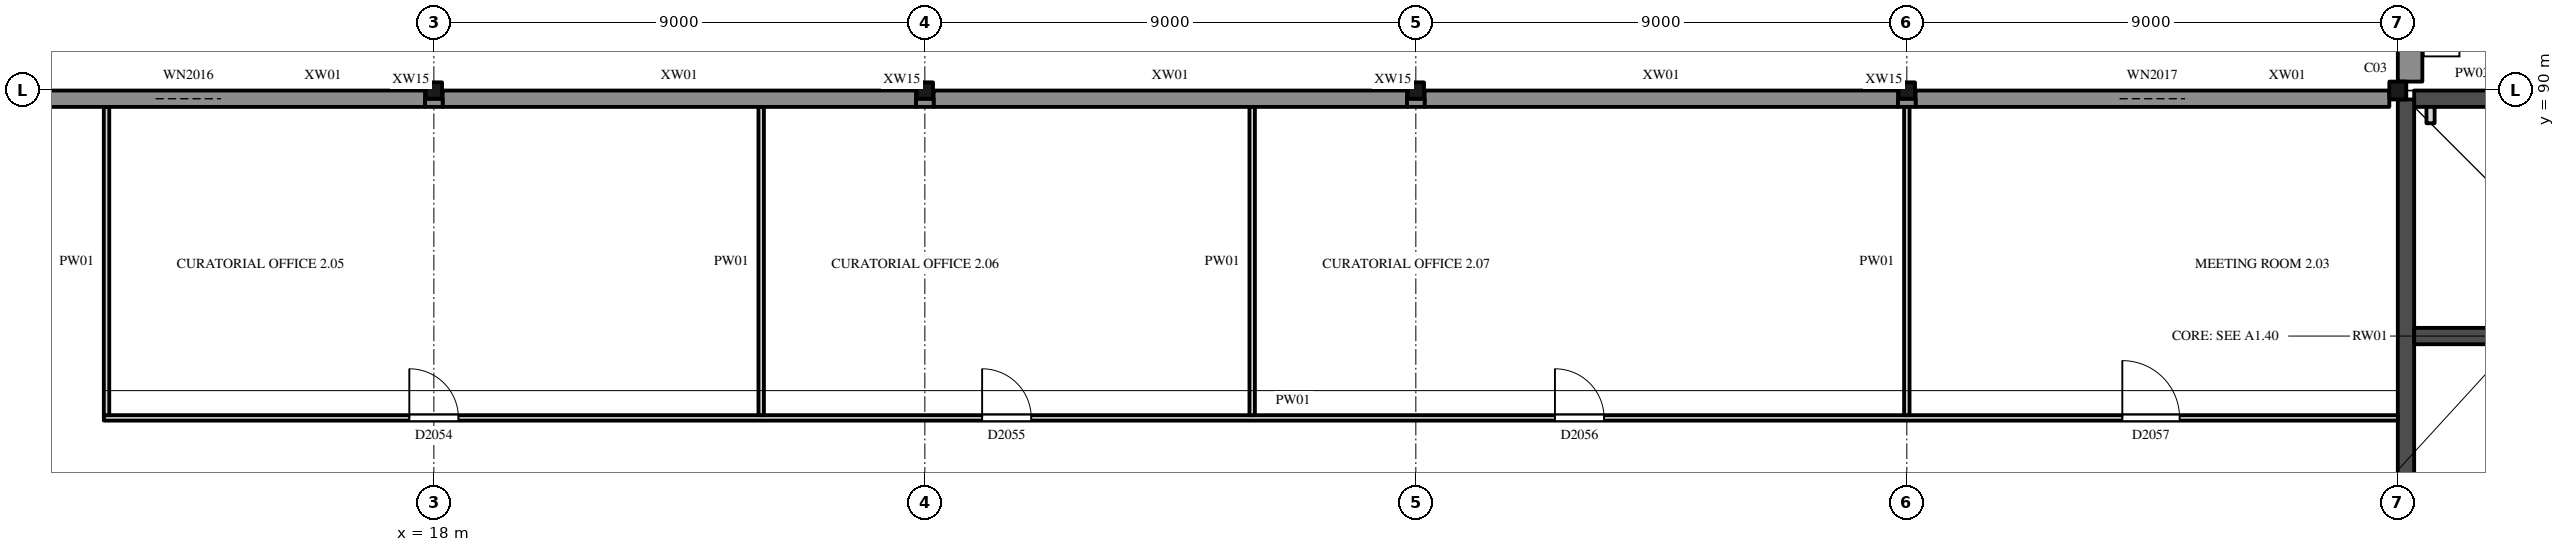
"""IFC4 building model, lengths in metres.
Left out: names, types, materials, properties, quantities, classifications, styles, units other than length and angle.
Written with IfcOpenShell. Run it as: python <this file> out.ifc"""

import sys

from ifc_helpers import new_model, si_unit, direction, frame, frame_2d, origin, origin_2d, place, context, subcontext, project, spatial, rectangle, hollow_rectangle, i_section, extrude, element, fill, save


model = new_model("IFC4")
c1 = context("Model", 3, precision=1e-05, world=origin(), true_north=direction((0.0, 1.0)))
c2 = subcontext(c1, "Body", "Model", "MODEL_VIEW")
j1 = project(units=[si_unit("LENGTHUNIT", "METRE"), si_unit("PLANEANGLEUNIT", "RADIAN")], contexts=[c1])
p1 = place(None, origin())
s1 = spatial("IfcSite", under=j1, at=p1, CompositionType="ELEMENT")
p2 = place(p1, origin())
s2 = spatial("IfcBuilding", under=s1, at=p2, CompositionType="ELEMENT")
p3 = place(p2, frame((0.0, 0.0, 11.0)))
s3 = spatial("IfcBuildingStorey", under=s2, at=p3, CompositionType="ELEMENT", Elevation=11.0)
for number, where, z_axis, x_axis in (
    (1, (18.0, 90.0, 0.0), (0.0, 0.0, 1.0), (1.0, 0.0, 0.0)),
    (2, (27.0, 90.0, 0.0), (0.0, 0.0, 1.0), (1.0, 0.0, 0.0)),
    (3, (36.0, 90.0, 0.0), (0.0, 0.0, 1.0), (1.0, 0.0, 0.0)),
    (4, (45.0, 90.0, 0.0), (0.0, 0.0, 1.0), (1.0, 0.0, 0.0)),
):
    element("IfcColumn", number, at=place(p3, frame(where, z_axis=z_axis, x_axis=x_axis)), inside=s3, PredefinedType="COLUMN", context=c2, shape_type="SweptSolid", body=[
        extrude(hollow_rectangle(XDim=0.3, YDim=0.3, WallThickness=0.012, InnerFilletRadius=0.019, OuterFilletRadius=0.031, at=origin_2d()), origin(), (0.0, 0.0, 1.0), 4.825),
    ])
p4 = place(p3, frame((54.0, 90.0, 0.0), z_axis=(0.0, 0.0, 1.0), x_axis=(1.0, 0.0, 0.0)))
e5 = element("IfcColumn", 5, at=p4, inside=s3, PredefinedType="COLUMN", context=c2, shape_type="SweptSolid", body=[
    extrude(i_section(OverallWidth=0.311, OverallDepth=0.327, WebThickness=0.016, FlangeThickness=0.025, FilletRadius=0.017, at=origin_2d()), origin(), (0.0, 0.0, 1.0), 5.0),
])
p5 = place(p3, frame((54.3, 89.85, 0.0), z_axis=(0.0, 0.0, 1.0), x_axis=(1.0, 0.0, 0.0)))
e6 = element("IfcWall", 6, at=p5, inside=s3, PredefinedType="SHEAR", context=c2, shape_type="SweptSolid", body=[
    extrude(rectangle(XDim=8.544, YDim=0.3, at=frame_2d((4.272, 0.0))), origin(), (0.0, 0.0, 1.0), 5.0),
])
p6 = place(p3, frame((54.15, 81.157, 0.0), z_axis=(0.0, 0.0, 1.0), x_axis=(0.0, 1.0, 0.0)))
e7 = element("IfcWall", 7, at=p6, inside=s3, PredefinedType="SHEAR", context=c2, shape_type="SweptSolid", body=[
    extrude(rectangle(XDim=8.679, YDim=0.3, at=frame_2d((4.34, 0.0))), origin(), (0.0, 0.0, 1.0), 5.0),
])
p7 = place(p3, frame((58.2, 85.5, 0.0), z_axis=(0.0, 0.0, 1.0), x_axis=(-1.0, 0.0, 0.0)))
e8 = element("IfcWall", 8, at=p7, inside=s3, PredefinedType="SHEAR", context=c2, shape_type="SweptSolid", body=[
    extrude(rectangle(XDim=3.9, YDim=0.3, at=frame_2d((1.95, 0.0))), origin(), (0.0, 0.0, 1.0), 5.0),
])
p8 = place(p3, frame((9.172, 89.85, 0.0), z_axis=(0.0, 0.0, 1.0), x_axis=(1.0, 0.0, 0.0)))
e9 = element("IfcWall", 9, at=p8, inside=s3, PredefinedType="SOLIDWALL", context=c2, shape_type="SweptSolid", body=[
    extrude(rectangle(XDim=8.667, YDim=0.3, at=frame_2d((4.333, 0.0))), origin(), (0.0, 0.0, 1.0), 4.825),
])
p9 = place(p8, frame((3.728, 0.0, 1.0)))
e10 = element("IfcOpeningElement", 10, at=p9, cuts=e9, PredefinedType="OPENING", context=c2, shape_type="SweptSolid", body=[
    extrude(rectangle(XDim=1.2, YDim=3.0, at=frame_2d((0.6, 1.5))), frame((0.0, 0.16, 0.0), z_axis=(0.0, -1.0, 0.0), x_axis=(1.0, 0.0, 0.0)), (0.0, 0.0, 1.0), 0.32),
])
for number, where, z_axis, x_axis in (
    (11, (18.161, 89.85, 0.0), (0.0, 0.0, 1.0), (1.0, 0.0, 0.0)),
    (12, (27.161, 89.85, 0.0), (0.0, 0.0, 1.0), (1.0, 0.0, 0.0)),
    (13, (36.161, 89.85, 0.0), (0.0, 0.0, 1.0), (1.0, 0.0, 0.0)),
):
    element("IfcWall", number, at=place(p3, frame(where, z_axis=z_axis, x_axis=x_axis)), inside=s3, PredefinedType="SOLIDWALL", context=c2, shape_type="SweptSolid", body=[
        extrude(rectangle(XDim=8.678, YDim=0.3, at=frame_2d((4.339, 0.0))), origin(), (0.0, 0.0, 1.0), 4.825),
    ])
p10 = place(p3, frame((45.161, 89.85, 0.0), z_axis=(0.0, 0.0, 1.0), x_axis=(1.0, 0.0, 0.0)))
e14 = element("IfcWall", 14, at=p10, inside=s3, PredefinedType="SOLIDWALL", context=c2, shape_type="SweptSolid", body=[
    extrude(rectangle(XDim=8.684, YDim=0.3, at=frame_2d((4.342, 0.0))), origin(), (0.0, 0.0, 1.0), 4.825),
])
p11 = place(p10, frame((3.739, 0.0, 1.0)))
e15 = element("IfcOpeningElement", 15, at=p11, cuts=e14, PredefinedType="OPENING", context=c2, shape_type="SweptSolid", body=[
    extrude(rectangle(XDim=1.2, YDim=3.0, at=frame_2d((0.6, 1.5))), frame((0.0, 0.16, 0.0), z_axis=(0.0, -1.0, 0.0), x_axis=(1.0, 0.0, 0.0)), (0.0, 0.0, 1.0), 0.32),
])
p12 = place(p3, frame((54.225, 90.164, 0.0), z_axis=(0.0, 0.0, 1.0), x_axis=(0.0, 1.0, 0.0)))
e16 = element("IfcWall", 16, at=p12, inside=s3, PredefinedType="SOLIDWALL", context=c2, shape_type="SweptSolid", body=[
    extrude(rectangle(XDim=8.676, YDim=0.45, at=frame_2d((4.338, 0.0))), origin(), (0.0, 0.0, 1.0), 4.371),
])
p13 = place(p12, frame((0.586, 0.0, 1.6)))
e17 = element("IfcOpeningElement", 17, at=p13, cuts=e16, PredefinedType="OPENING", context=c2, shape_type="SweptSolid", body=[
    extrude(rectangle(XDim=7.5, YDim=1.2, at=frame_2d((3.75, 0.6))), frame((0.0, 0.235, 0.0), z_axis=(0.0, -1.0, 0.0), x_axis=(1.0, 0.0, 0.0)), (0.0, 0.0, 1.0), 0.47),
])
for number, where, z_axis, x_axis in (
    (18, (17.839, 89.775, 0.0), (0.0, 0.0, 1.0), (1.0, 0.0, 0.0)),
    (19, (26.839, 89.775, 0.0), (0.0, 0.0, 1.0), (1.0, 0.0, 0.0)),
    (20, (35.839, 89.775, 0.0), (0.0, 0.0, 1.0), (1.0, 0.0, 0.0)),
    (21, (44.839, 89.775, 0.0), (0.0, 0.0, 1.0), (1.0, 0.0, 0.0)),
):
    element("IfcWall", number, at=place(p3, frame(where, z_axis=z_axis, x_axis=x_axis)), inside=s3, PredefinedType="SOLIDWALL", context=c2, shape_type="SweptSolid", body=[
        extrude(rectangle(XDim=0.322, YDim=0.15, at=frame_2d((0.161, 0.0))), origin(), (0.0, 0.0, 1.0), 4.825),
    ])
for number, where, z_axis, x_axis in (
    (22, (10.5, 83.325, 5.0), (0.0, 0.0, 1.0), (1.0, 0.0, 0.0)),
    (23, (10.5, 87.675, 5.0), (0.0, 0.0, 1.0), (1.0, 0.0, 0.0)),
):
    element("IfcWall", number, at=place(p3, frame(where, z_axis=z_axis, x_axis=x_axis)), inside=s3, PredefinedType="PARAPET", context=c2, shape_type="SweptSolid", body=[
        extrude(rectangle(XDim=6.0, YDim=0.15, at=frame_2d((3.0, 0.0))), origin(), (0.0, 0.0, 1.0), 0.5),
    ])
p14 = place(p3, frame((16.425, 83.4, 5.0), z_axis=(0.0, 0.0, 1.0), x_axis=(0.0, 1.0, 0.0)))
e24 = element("IfcWall", 24, at=p14, inside=s3, PredefinedType="PARAPET", context=c2, shape_type="SweptSolid", body=[
    extrude(rectangle(XDim=4.2, YDim=0.15, at=frame_2d((2.1, 0.0))), origin(), (0.0, 0.0, 1.0), 0.5),
])
for number, where, z_axis, x_axis in (
    (25, (19.5, 83.325, 5.0), (0.0, 0.0, 1.0), (1.0, 0.0, 0.0)),
    (26, (19.5, 87.675, 5.0), (0.0, 0.0, 1.0), (1.0, 0.0, 0.0)),
):
    element("IfcWall", number, at=place(p3, frame(where, z_axis=z_axis, x_axis=x_axis)), inside=s3, PredefinedType="PARAPET", context=c2, shape_type="SweptSolid", body=[
        extrude(rectangle(XDim=6.0, YDim=0.15, at=frame_2d((3.0, 0.0))), origin(), (0.0, 0.0, 1.0), 0.5),
    ])
for number, where, z_axis, x_axis in (
    (27, (19.575, 83.4, 5.0), (0.0, 0.0, 1.0), (0.0, 1.0, 0.0)),
    (28, (25.425, 83.4, 5.0), (0.0, 0.0, 1.0), (0.0, 1.0, 0.0)),
):
    element("IfcWall", number, at=place(p3, frame(where, z_axis=z_axis, x_axis=x_axis)), inside=s3, PredefinedType="PARAPET", context=c2, shape_type="SweptSolid", body=[
        extrude(rectangle(XDim=4.2, YDim=0.15, at=frame_2d((2.1, 0.0))), origin(), (0.0, 0.0, 1.0), 0.5),
    ])
for number, where, z_axis, x_axis in (
    (29, (28.5, 83.325, 5.0), (0.0, 0.0, 1.0), (1.0, 0.0, 0.0)),
    (30, (28.5, 87.675, 5.0), (0.0, 0.0, 1.0), (1.0, 0.0, 0.0)),
):
    element("IfcWall", number, at=place(p3, frame(where, z_axis=z_axis, x_axis=x_axis)), inside=s3, PredefinedType="PARAPET", context=c2, shape_type="SweptSolid", body=[
        extrude(rectangle(XDim=6.0, YDim=0.15, at=frame_2d((3.0, 0.0))), origin(), (0.0, 0.0, 1.0), 0.5),
    ])
for number, where, z_axis, x_axis in (
    (31, (28.575, 83.4, 5.0), (0.0, 0.0, 1.0), (0.0, 1.0, 0.0)),
    (32, (34.425, 83.4, 5.0), (0.0, 0.0, 1.0), (0.0, 1.0, 0.0)),
):
    element("IfcWall", number, at=place(p3, frame(where, z_axis=z_axis, x_axis=x_axis)), inside=s3, PredefinedType="PARAPET", context=c2, shape_type="SweptSolid", body=[
        extrude(rectangle(XDim=4.2, YDim=0.15, at=frame_2d((2.1, 0.0))), origin(), (0.0, 0.0, 1.0), 0.5),
    ])
for number, where, z_axis, x_axis in (
    (33, (37.5, 83.325, 5.0), (0.0, 0.0, 1.0), (1.0, 0.0, 0.0)),
    (34, (37.5, 87.675, 5.0), (0.0, 0.0, 1.0), (1.0, 0.0, 0.0)),
):
    element("IfcWall", number, at=place(p3, frame(where, z_axis=z_axis, x_axis=x_axis)), inside=s3, PredefinedType="PARAPET", context=c2, shape_type="SweptSolid", body=[
        extrude(rectangle(XDim=6.0, YDim=0.15, at=frame_2d((3.0, 0.0))), origin(), (0.0, 0.0, 1.0), 0.5),
    ])
for number, where, z_axis, x_axis in (
    (35, (37.575, 83.4, 5.0), (0.0, 0.0, 1.0), (0.0, 1.0, 0.0)),
    (36, (43.425, 83.4, 5.0), (0.0, 0.0, 1.0), (0.0, 1.0, 0.0)),
):
    element("IfcWall", number, at=place(p3, frame(where, z_axis=z_axis, x_axis=x_axis)), inside=s3, PredefinedType="PARAPET", context=c2, shape_type="SweptSolid", body=[
        extrude(rectangle(XDim=4.2, YDim=0.15, at=frame_2d((2.1, 0.0))), origin(), (0.0, 0.0, 1.0), 0.5),
    ])
for number, where, z_axis, x_axis in (
    (37, (46.5, 83.325, 5.0), (0.0, 0.0, 1.0), (1.0, 0.0, 0.0)),
    (38, (46.5, 87.675, 5.0), (0.0, 0.0, 1.0), (1.0, 0.0, 0.0)),
):
    element("IfcWall", number, at=place(p3, frame(where, z_axis=z_axis, x_axis=x_axis)), inside=s3, PredefinedType="PARAPET", context=c2, shape_type="SweptSolid", body=[
        extrude(rectangle(XDim=6.0, YDim=0.15, at=frame_2d((3.0, 0.0))), origin(), (0.0, 0.0, 1.0), 0.5),
    ])
for number, where, z_axis, x_axis in (
    (39, (46.575, 83.4, 5.0), (0.0, 0.0, 1.0), (0.0, 1.0, 0.0)),
    (40, (52.425, 83.4, 5.0), (0.0, 0.0, 1.0), (0.0, 1.0, 0.0)),
):
    element("IfcWall", number, at=place(p3, frame(where, z_axis=z_axis, x_axis=x_axis)), inside=s3, PredefinedType="PARAPET", context=c2, shape_type="SweptSolid", body=[
        extrude(rectangle(XDim=4.2, YDim=0.15, at=frame_2d((2.1, 0.0))), origin(), (0.0, 0.0, 1.0), 0.5),
    ])
p15 = place(p3, frame((11.95, 84.0, 0.0), z_axis=(0.0, 0.0, 1.0), x_axis=(1.0, 0.0, 0.0)))
e41 = element("IfcWall", 41, at=p15, inside=s3, PredefinedType="PARTITIONING", context=c2, shape_type="SweptSolid", body=[
    extrude(rectangle(XDim=42.05, YDim=0.1, at=frame_2d((21.025, 0.0))), origin(), (0.0, 0.0, 1.0), 4.422),
])
p16 = place(p15, frame((5.6, 0.0, 0.0)))
e42 = element("IfcOpeningElement", 42, at=p16, cuts=e41, PredefinedType="OPENING", context=c2, shape_type="SweptSolid", body=[
    extrude(rectangle(XDim=0.9, YDim=2.1, at=frame_2d((0.45, 1.05))), frame((0.0, 0.06, 0.0), z_axis=(0.0, -1.0, 0.0), x_axis=(1.0, 0.0, 0.0)), (0.0, 0.0, 1.0), 0.12),
])
p17 = place(p15, frame((16.1, 0.0, 0.0)))
e43 = element("IfcOpeningElement", 43, at=p17, cuts=e41, PredefinedType="OPENING", context=c2, shape_type="SweptSolid", body=[
    extrude(rectangle(XDim=0.9, YDim=2.1, at=frame_2d((0.45, 1.05))), frame((0.0, 0.06, 0.0), z_axis=(0.0, -1.0, 0.0), x_axis=(1.0, 0.0, 0.0)), (0.0, 0.0, 1.0), 0.12),
])
p18 = place(p15, frame((26.6, 0.0, 0.0)))
e44 = element("IfcOpeningElement", 44, at=p18, cuts=e41, PredefinedType="OPENING", context=c2, shape_type="SweptSolid", body=[
    extrude(rectangle(XDim=0.9, YDim=2.1, at=frame_2d((0.45, 1.05))), frame((0.0, 0.06, 0.0), z_axis=(0.0, -1.0, 0.0), x_axis=(1.0, 0.0, 0.0)), (0.0, 0.0, 1.0), 0.12),
])
p19 = place(p15, frame((37.0, 0.0, 0.0)))
e45 = element("IfcOpeningElement", 45, at=p19, cuts=e41, PredefinedType="OPENING", context=c2, shape_type="SweptSolid", body=[
    extrude(rectangle(XDim=1.05, YDim=2.1, at=frame_2d((0.525, 1.05))), frame((0.0, 0.06, 0.0), z_axis=(0.0, -1.0, 0.0), x_axis=(1.0, 0.0, 0.0)), (0.0, 0.0, 1.0), 0.12),
])
for number, where, z_axis, x_axis in (
    (46, (12.0, 84.05, 0.0), (0.0, 0.0, 1.0), (0.0, 1.0, 0.0)),
    (47, (24.0, 84.05, 0.0), (0.0, 0.0, 1.0), (0.0, 1.0, 0.0)),
    (48, (33.0, 84.05, 0.0), (0.0, 0.0, 1.0), (0.0, 1.0, 0.0)),
):
    element("IfcWall", number, at=place(p3, frame(where, z_axis=z_axis, x_axis=x_axis)), inside=s3, PredefinedType="PARTITIONING", context=c2, shape_type="SweptSolid", body=[
        extrude(rectangle(XDim=5.65, YDim=0.1, at=frame_2d((2.825, 0.0))), origin(), (0.0, 0.0, 1.0), 4.742),
    ])
p20 = place(p3, frame((45.0, 84.05, 0.0), z_axis=(0.0, 0.0, 1.0), x_axis=(0.0, 1.0, 0.0)))
e49 = element("IfcWall", 49, at=p20, inside=s3, PredefinedType="PARTITIONING", context=c2, shape_type="SweptSolid", body=[
    extrude(rectangle(XDim=5.65, YDim=0.1, at=frame_2d((2.825, 0.0))), origin(), (0.0, 0.0, 1.0), 4.371),
])
p21 = place(p3, frame((54.6, 89.4, 0.0), z_axis=(0.0, 0.0, 1.0), x_axis=(0.0, 1.0, 0.0)))
e50 = element("IfcWall", 50, at=p21, inside=s3, PredefinedType="PARTITIONING", context=c2, shape_type="SweptSolid", body=[
    extrude(rectangle(XDim=0.3, YDim=0.15, at=frame_2d((0.15, 0.0))), origin(), (0.0, 0.0, 1.0), 4.825),
])
p22 = place(p9, origin())
e51 = element("IfcWindow", 51, at=p22, inside=s3, PartitioningType="SINGLE_PANEL", PredefinedType="WINDOW", context=c2, shape_type="SweptSolid", body=[
    extrude(rectangle(XDim=1.2, YDim=3.0, at=frame_2d((0.6, 1.5))), frame((0.0, 0.03, 0.0), z_axis=(0.0, -1.0, 0.0), x_axis=(1.0, 0.0, 0.0)), (0.0, 0.0, 1.0), 0.06),
])
fill(e10, e51)
p23 = place(p11, origin())
e52 = element("IfcWindow", 52, at=p23, inside=s3, PartitioningType="SINGLE_PANEL", PredefinedType="WINDOW", context=c2, shape_type="SweptSolid", body=[
    extrude(rectangle(XDim=1.2, YDim=3.0, at=frame_2d((0.6, 1.5))), frame((0.0, 0.03, 0.0), z_axis=(0.0, -1.0, 0.0), x_axis=(1.0, 0.0, 0.0)), (0.0, 0.0, 1.0), 0.06),
])
fill(e15, e52)
p24 = place(p16, origin())
e53 = element("IfcDoor", 53, at=p24, inside=s3, OperationType="SINGLE_SWING_RIGHT", PredefinedType="DOOR", context=c2, shape_type="SweptSolid", body=[
    extrude(rectangle(XDim=0.9, YDim=2.1, at=frame_2d((0.45, 1.05))), frame((0.0, 0.025, 0.0), z_axis=(0.0, -1.0, 0.0), x_axis=(1.0, 0.0, 0.0)), (0.0, 0.0, 1.0), 0.05),
])
fill(e42, e53)
p25 = place(p17, origin())
e54 = element("IfcDoor", 54, at=p25, inside=s3, OperationType="SINGLE_SWING_RIGHT", PredefinedType="DOOR", context=c2, shape_type="SweptSolid", body=[
    extrude(rectangle(XDim=0.9, YDim=2.1, at=frame_2d((0.45, 1.05))), frame((0.0, 0.025, 0.0), z_axis=(0.0, -1.0, 0.0), x_axis=(1.0, 0.0, 0.0)), (0.0, 0.0, 1.0), 0.05),
])
fill(e43, e54)
p26 = place(p18, origin())
e55 = element("IfcDoor", 55, at=p26, inside=s3, OperationType="SINGLE_SWING_RIGHT", PredefinedType="DOOR", context=c2, shape_type="SweptSolid", body=[
    extrude(rectangle(XDim=0.9, YDim=2.1, at=frame_2d((0.45, 1.05))), frame((0.0, 0.025, 0.0), z_axis=(0.0, -1.0, 0.0), x_axis=(1.0, 0.0, 0.0)), (0.0, 0.0, 1.0), 0.05),
])
fill(e44, e55)
p27 = place(p19, origin())
e56 = element("IfcDoor", 56, at=p27, inside=s3, OperationType="SINGLE_SWING_RIGHT", PredefinedType="DOOR", context=c2, shape_type="SweptSolid", body=[
    extrude(rectangle(XDim=1.05, YDim=2.1, at=frame_2d((0.525, 1.05))), frame((0.0, 0.025, 0.0), z_axis=(0.0, -1.0, 0.0), x_axis=(1.0, 0.0, 0.0)), (0.0, 0.0, 1.0), 0.05),
])
fill(e45, e56)
save(model, sys.argv[1])
